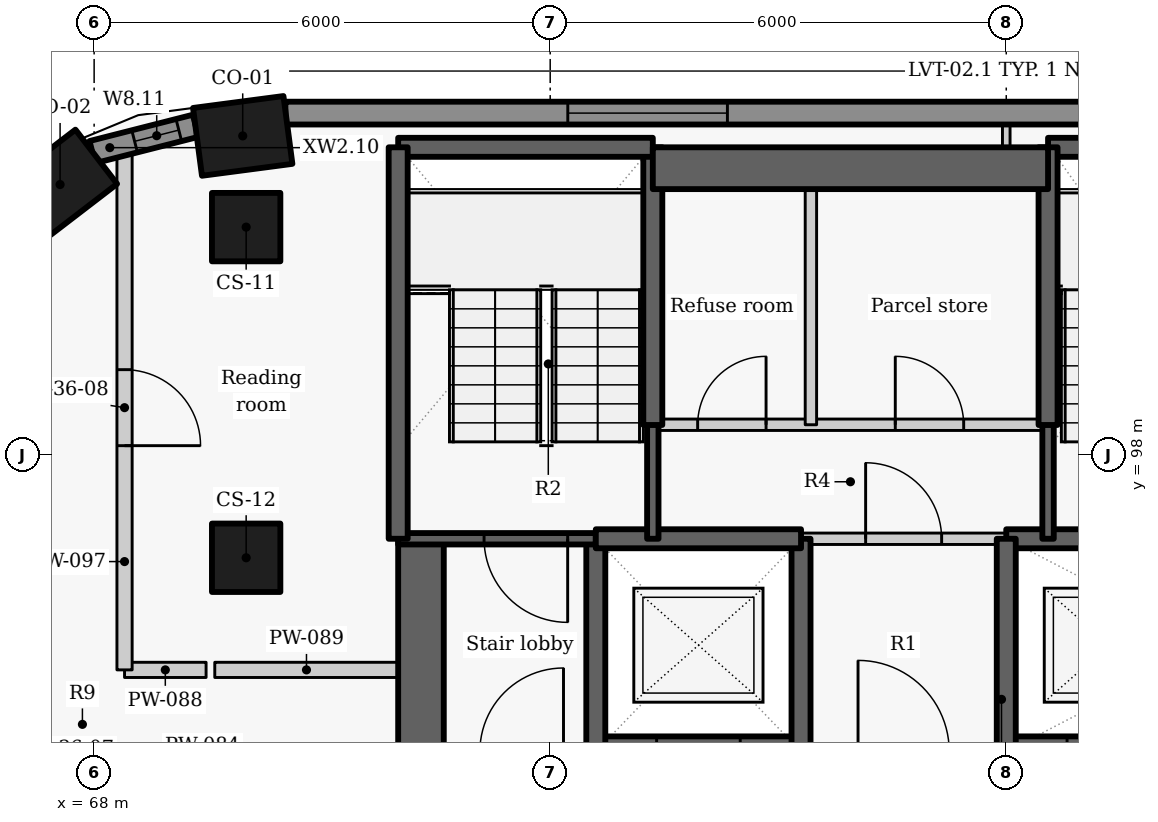
"""IFC4 building model, lengths in metres.
Left out: names, types, materials, properties, quantities, classifications, styles, units other than length and angle.
Written with IfcOpenShell. Run it as: python <this file> out.ifc"""

import sys

from ifc_helpers import new_model, si_unit, direction, frame, frame_2d, origin, origin_2d, place, context, subcontext, project, spatial, rectangle, extrude, element, fill, save


model = new_model("IFC4")
c1 = context("Model", 3, precision=1e-05, world=origin(), true_north=direction((0.0, 1.0)))
c2 = subcontext(c1, "Body", "Model", "MODEL_VIEW")
j1 = project(units=[si_unit("LENGTHUNIT", "METRE"), si_unit("PLANEANGLEUNIT", "RADIAN")], contexts=[c1])
p1 = place(None, origin())
s1 = spatial("IfcSite", under=j1, at=p1, CompositionType="ELEMENT")
p2 = place(p1, origin())
s2 = spatial("IfcBuilding", under=s1, at=p2, CompositionType="ELEMENT")
p3 = place(p2, frame((0.0, 0.0, 216.3)))
s3 = spatial("IfcBuildingStorey", under=s2, at=p3, CompositionType="ELEMENT", Elevation=216.3)
for number, where, z_axis, x_axis in (
    (1, (69.955, 102.2, 0.0), (0.0, 0.0, 1.0), (-0.991, -0.131, 0.0)),
    (2, (67.552, 101.56, 0.0), (0.0, 0.0, 1.0), (-0.793, -0.609, 0.0)),
):
    element("IfcColumn", number, at=place(p3, frame(where, z_axis=z_axis, x_axis=x_axis)), inside=s3, PredefinedType="COLUMN", context=c2, shape_type="SweptSolid", body=[
        extrude(rectangle(XDim=1.2, YDim=0.9, at=origin_2d()), origin(), (0.0, 0.0, 1.0), 3.3),
    ])
for number, where, z_axis, x_axis in (
    (3, (70.0, 101.0, 0.0), (0.0, 0.0, 1.0), (0.0, -1.0, 0.0)),
    (4, (70.0, 96.65, 0.0), (0.0, 0.0, 1.0), (0.0, -1.0, 0.0)),
):
    element("IfcColumn", number, at=place(p3, frame(where, z_axis=z_axis, x_axis=x_axis)), inside=s3, PredefinedType="COLUMN", context=c2, shape_type="SweptSolid", body=[
        extrude(rectangle(XDim=0.9, YDim=0.9, at=origin_2d()), origin(), (0.0, 0.0, 1.0), 3.3),
    ])
p4 = place(p3, frame((89.449, 102.5, 0.0), z_axis=(0.0, 0.0, 1.0), x_axis=(-1.0, 0.0, 0.0)))
e5 = element("IfcWall", 5, at=p4, inside=s3, PredefinedType="SOLIDWALL", context=c2, shape_type="SweptSolid", body=[
    extrude(rectangle(XDim=18.933, YDim=0.3, at=frame_2d((9.466, 0.0))), origin(), (0.0, 0.0, 1.0), 2.05),
])
p5 = place(p4, frame((3.687, 0.0, 0.9)))
e6 = element("IfcOpeningElement", 6, at=p5, cuts=e5, PredefinedType="OPENING", context=c2, shape_type="SweptSolid", body=[
    extrude(rectangle(XDim=2.1, YDim=1.1, at=frame_2d((1.05, 0.55))), frame((0.0, 0.16, 0.0), z_axis=(0.0, -1.0, 0.0), x_axis=(1.0, 0.0, 0.0)), (0.0, 0.0, 1.0), 0.32),
])
p6 = place(p4, frame((13.118, 0.0, 0.9)))
e7 = element("IfcOpeningElement", 7, at=p6, cuts=e5, PredefinedType="OPENING", context=c2, shape_type="SweptSolid", body=[
    extrude(rectangle(XDim=2.1, YDim=1.1, at=frame_2d((1.05, 0.55))), frame((0.0, 0.16, 0.0), z_axis=(0.0, -1.0, 0.0), x_axis=(1.0, 0.0, 0.0)), (0.0, 0.0, 1.0), 0.32),
])
p7 = place(p3, frame((69.336, 102.333, 0.0), z_axis=(0.0, 0.0, 1.0), x_axis=(-0.969037396898, -0.246914000036, 0.0)))
e8 = element("IfcWall", 8, at=p7, inside=s3, PredefinedType="SOLIDWALL", context=c2, shape_type="SweptSolid", body=[
    extrude(rectangle(XDim=1.403, YDim=0.3, at=frame_2d((0.702, 0.0))), origin(), (0.0, 0.0, 1.0), 2.05),
])
p8 = place(p7, frame((0.229, 0.0, 0.9)))
e9 = element("IfcOpeningElement", 9, at=p8, cuts=e8, PredefinedType="OPENING", context=c2, shape_type="SweptSolid", body=[
    extrude(rectangle(XDim=0.6, YDim=1.1, at=frame_2d((0.3, 0.55))), frame((0.0, 0.16, 0.0), z_axis=(0.0, -1.0, 0.0), x_axis=(1.0, 0.0, 0.0)), (0.0, 0.0, 1.0), 0.32),
])
p9 = place(p3, frame((72.3, 87.8, -0.275), z_axis=(0.0, 0.0, 1.0), x_axis=(0.0, 1.0, 0.0)))
e10 = element("IfcWall", 10, at=p9, inside=s3, PredefinedType="SHEAR", context=c2, shape_type="SweptSolid", body=[
    extrude(rectangle(XDim=9.1, YDim=0.6, at=frame_2d((4.55, 0.0))), origin(), (0.0, 0.0, 1.0), 3.225),
])
p10 = place(p9, frame((3.852, 0.0, 0.275)))
e11 = element("IfcOpeningElement", 11, at=p10, cuts=e10, PredefinedType="OPENING", context=c2, shape_type="SweptSolid", body=[
    extrude(rectangle(XDim=1.5, YDim=2.1, at=frame_2d((0.75, 1.05))), frame((0.0, 0.31, 0.0), z_axis=(0.0, -1.0, 0.0), x_axis=(1.0, 0.0, 0.0)), (0.0, 0.0, 1.0), 0.62),
])
p11 = place(p3, frame((74.597, 94.1, -0.275), z_axis=(0.0, 0.0, 1.0), x_axis=(1.0, 0.0, 0.0)))
e12 = element("IfcWall", 12, at=p11, inside=s3, PredefinedType="SHEAR", context=c2, shape_type="SweptSolid", body=[
    extrude(rectangle(XDim=2.706, YDim=0.4, at=frame_2d((1.353, 0.0))), origin(), (0.0, 0.0, 1.0), 3.225),
])
p12 = place(p11, frame((0.803, 0.0, 0.275)))
e13 = element("IfcOpeningElement", 13, at=p12, cuts=e12, PredefinedType="OPENING", context=c2, shape_type="SweptSolid", body=[
    extrude(rectangle(XDim=1.1, YDim=2.1, at=frame_2d((0.55, 1.05))), frame((0.0, 0.21, 0.0), z_axis=(0.0, -1.0, 0.0), x_axis=(1.0, 0.0, 0.0)), (0.0, 0.0, 1.0), 0.42),
])
p13 = place(p3, frame((79.997, 94.1, -0.275), z_axis=(0.0, 0.0, 1.0), x_axis=(1.0, 0.0, 0.0)))
e14 = element("IfcWall", 14, at=p13, inside=s3, PredefinedType="SHEAR", context=c2, shape_type="SweptSolid", body=[
    extrude(rectangle(XDim=5.406, YDim=0.4, at=frame_2d((2.703, 0.0))), origin(), (0.0, 0.0, 1.0), 3.225),
])
p14 = place(p13, frame((0.803, 0.0, 0.275)))
e15 = element("IfcOpeningElement", 15, at=p14, cuts=e14, PredefinedType="OPENING", context=c2, shape_type="SweptSolid", body=[
    extrude(rectangle(XDim=1.1, YDim=2.1, at=frame_2d((0.55, 1.05))), frame((0.0, 0.21, 0.0), z_axis=(0.0, -1.0, 0.0), x_axis=(1.0, 0.0, 0.0)), (0.0, 0.0, 1.0), 0.42),
])
p15 = place(p3, frame((74.6, 94.1, -0.275), z_axis=(0.0, 0.0, 1.0), x_axis=(0.0, 1.0, 0.0)))
e16 = element("IfcWall", 16, at=p15, inside=s3, PredefinedType="SHEAR", context=c2, shape_type="SweptSolid", body=[
    extrude(rectangle(XDim=2.8, YDim=0.25, at=frame_2d((1.4, 0.0))), origin(), (0.0, 0.0, 1.0), 3.225),
])
p16 = place(p3, frame((74.6, 96.9, -0.275), z_axis=(0.0, 0.0, 1.0), x_axis=(-1.0, 0.0, 0.0)))
e17 = element("IfcWall", 17, at=p16, inside=s3, PredefinedType="SHEAR", context=c2, shape_type="SweptSolid", body=[
    extrude(rectangle(XDim=2.6, YDim=0.15, at=frame_2d((1.3, 0.0))), origin(), (0.0, 0.0, 1.0), 3.225),
])
p17 = place(p16, frame((0.37, 0.0, 0.275)))
e18 = element("IfcOpeningElement", 18, at=p17, cuts=e17, PredefinedType="OPENING", context=c2, shape_type="SweptSolid", body=[
    extrude(rectangle(XDim=1.1, YDim=2.1, at=frame_2d((0.55, 1.05))), frame((0.0, 0.085, 0.0), z_axis=(0.0, -1.0, 0.0), x_axis=(1.0, 0.0, 0.0)), (0.0, 0.0, 1.0), 0.17),
])
p18 = place(p3, frame((77.3, 94.1, -0.275), z_axis=(0.0, 0.0, 1.0), x_axis=(0.0, 1.0, 0.0)))
e19 = element("IfcWall", 19, at=p18, inside=s3, PredefinedType="SHEAR", context=c2, shape_type="SweptSolid", body=[
    extrude(rectangle(XDim=2.8, YDim=0.25, at=frame_2d((1.4, 0.0))), origin(), (0.0, 0.0, 1.0), 3.225),
])
p19 = place(p3, frame((74.6, 96.9, -0.275), z_axis=(0.0, 0.0, 1.0), x_axis=(1.0, 0.0, 0.0)))
e20 = element("IfcWall", 20, at=p19, inside=s3, PredefinedType="SHEAR", context=c2, shape_type="SweptSolid", body=[
    extrude(rectangle(XDim=2.7, YDim=0.25, at=frame_2d((1.35, 0.0))), origin(), (0.0, 0.0, 1.0), 3.225),
])
p20 = place(p3, frame((80.0, 96.9, -0.275), z_axis=(0.0, 0.0, 1.0), x_axis=(1.0, 0.0, 0.0)))
e21 = element("IfcWall", 21, at=p20, inside=s3, PredefinedType="SHEAR", context=c2, shape_type="SweptSolid", body=[
    extrude(rectangle(XDim=8.0, YDim=0.25, at=frame_2d((4.0, 0.0))), origin(), (0.0, 0.0, 1.0), 3.225),
])
p21 = place(p20, frame((3.849, 0.0, 0.275)))
e22 = element("IfcOpeningElement", 22, at=p21, cuts=e21, PredefinedType="OPENING", context=c2, shape_type="SweptSolid", body=[
    extrude(rectangle(XDim=1.1, YDim=2.1, at=frame_2d((0.55, 1.05))), frame((0.0, 0.135, 0.0), z_axis=(0.0, -1.0, 0.0), x_axis=(1.0, 0.0, 0.0)), (0.0, 0.0, 1.0), 0.27),
])
p22 = place(p3, frame((80.0, 94.1, -0.275), z_axis=(0.0, 0.0, 1.0), x_axis=(0.0, 1.0, 0.0)))
e23 = element("IfcWall", 23, at=p22, inside=s3, PredefinedType="SHEAR", context=c2, shape_type="SweptSolid", body=[
    extrude(rectangle(XDim=2.8, YDim=0.25, at=frame_2d((1.4, 0.0))), origin(), (0.0, 0.0, 1.0), 3.225),
])
p23 = place(p3, frame((77.3, 96.9, 0.0), z_axis=(0.0, 0.0, 1.0), x_axis=(1.0, 0.0, 0.0)))
e24 = element("IfcWall", 24, at=p23, inside=s3, PredefinedType="PARTITIONING", context=c2, shape_type="SweptSolid", body=[
    extrude(rectangle(XDim=2.7, YDim=0.15, at=frame_2d((1.35, 0.0))), origin(), (0.0, 0.0, 1.0), 2.95),
])
p24 = place(p23, frame((0.85, 0.0, 0.0)))
e25 = element("IfcOpeningElement", 25, at=p24, cuts=e24, PredefinedType="OPENING", context=c2, shape_type="SweptSolid", body=[
    extrude(rectangle(XDim=1.0, YDim=2.1, at=frame_2d((0.5, 1.05))), frame((0.0, 0.085, 0.0), z_axis=(0.0, -1.0, 0.0), x_axis=(1.0, 0.0, 0.0)), (0.0, 0.0, 1.0), 0.17),
])
p25 = place(p3, frame((75.35, 96.9, -0.275), z_axis=(0.0, 0.0, 1.0), x_axis=(0.0, 1.0, 0.0)))
e26 = element("IfcWall", 26, at=p25, inside=s3, PredefinedType="SHEAR", context=c2, shape_type="SweptSolid", body=[
    extrude(rectangle(XDim=1.503, YDim=0.15, at=frame_2d((0.751, 0.0))), origin(), (0.0, 0.0, 1.0), 3.225),
])
p26 = place(p3, frame((75.35, 98.397, -0.275), z_axis=(0.0, 0.0, 1.0), x_axis=(0.0, 1.0, 0.0)))
e27 = element("IfcWall", 27, at=p26, inside=s3, PredefinedType="SHEAR", context=c2, shape_type="SweptSolid", body=[
    extrude(rectangle(XDim=3.653, YDim=0.25, at=frame_2d((1.827, 0.0))), origin(), (0.0, 0.0, 1.0), 3.225),
])
p27 = place(p3, frame((72.0, 102.05, -0.275), z_axis=(0.0, 0.0, 1.0), x_axis=(1.0, 0.0, 0.0)))
e28 = element("IfcWall", 28, at=p27, inside=s3, PredefinedType="SHEAR", context=c2, shape_type="SweptSolid", body=[
    extrude(rectangle(XDim=3.35, YDim=0.25, at=frame_2d((1.675, 0.0))), origin(), (0.0, 0.0, 1.0), 3.225),
])
p28 = place(p3, frame((80.55, 102.05, -0.275), z_axis=(0.0, 0.0, 1.0), x_axis=(1.0, 0.0, 0.0)))
e29 = element("IfcWall", 29, at=p28, inside=s3, PredefinedType="SHEAR", context=c2, shape_type="SweptSolid", body=[
    extrude(rectangle(XDim=2.85, YDim=0.25, at=frame_2d((1.425, 0.0))), origin(), (0.0, 0.0, 1.0), 3.225),
])
p29 = place(p3, frame((72.0, 96.9, -0.275), z_axis=(0.0, 0.0, 1.0), x_axis=(0.0, 1.0, 0.0)))
e30 = element("IfcWall", 30, at=p29, inside=s3, PredefinedType="SHEAR", context=c2, shape_type="SweptSolid", body=[
    extrude(rectangle(XDim=5.15, YDim=0.25, at=frame_2d((2.575, 0.0))), origin(), (0.0, 0.0, 1.0), 3.225),
])
p30 = place(p3, frame((80.55, 96.9, -0.275), z_axis=(0.0, 0.0, 1.0), x_axis=(0.0, 1.0, 0.0)))
e31 = element("IfcWall", 31, at=p30, inside=s3, PredefinedType="SHEAR", context=c2, shape_type="SweptSolid", body=[
    extrude(rectangle(XDim=1.503, YDim=0.15, at=frame_2d((0.751, 0.0))), origin(), (0.0, 0.0, 1.0), 3.225),
])
p31 = place(p3, frame((80.55, 98.397, -0.275), z_axis=(0.0, 0.0, 1.0), x_axis=(0.0, 1.0, 0.0)))
e32 = element("IfcWall", 32, at=p31, inside=s3, PredefinedType="SHEAR", context=c2, shape_type="SweptSolid", body=[
    extrude(rectangle(XDim=3.653, YDim=0.25, at=frame_2d((1.827, 0.0))), origin(), (0.0, 0.0, 1.0), 3.225),
])
p32 = place(p3, frame((75.35, 101.775, -0.275), z_axis=(0.0, 0.0, 1.0), x_axis=(1.0, 0.0, 0.0)))
e33 = element("IfcWall", 33, at=p32, inside=s3, PredefinedType="SHEAR", context=c2, shape_type="SweptSolid", body=[
    extrude(rectangle(XDim=5.2, YDim=0.55, at=frame_2d((2.6, 0.0))), origin(), (0.0, 0.0, 1.0), 3.225),
])
p33 = place(p3, frame((75.35, 98.4, 0.0), z_axis=(0.0, 0.0, 1.0), x_axis=(1.0, 0.0, 0.0)))
e34 = element("IfcWall", 34, at=p33, inside=s3, PredefinedType="PARTITIONING", context=c2, shape_type="SweptSolid", body=[
    extrude(rectangle(XDim=5.2, YDim=0.15, at=frame_2d((2.6, 0.0))), origin(), (0.0, 0.0, 1.0), 2.95),
])
p34 = place(p33, frame((0.59, 0.0, 0.0)))
e35 = element("IfcOpeningElement", 35, at=p34, cuts=e34, PredefinedType="OPENING", context=c2, shape_type="SweptSolid", body=[
    extrude(rectangle(XDim=0.9, YDim=2.1, at=frame_2d((0.45, 1.05))), frame((0.0, 0.085, 0.0), z_axis=(0.0, -1.0, 0.0), x_axis=(1.0, 0.0, 0.0)), (0.0, 0.0, 1.0), 0.17),
])
p35 = place(p33, frame((3.19, 0.0, 0.0)))
e36 = element("IfcOpeningElement", 36, at=p35, cuts=e34, PredefinedType="OPENING", context=c2, shape_type="SweptSolid", body=[
    extrude(rectangle(XDim=0.9, YDim=2.1, at=frame_2d((0.45, 1.05))), frame((0.0, 0.085, 0.0), z_axis=(0.0, -1.0, 0.0), x_axis=(1.0, 0.0, 0.0)), (0.0, 0.0, 1.0), 0.17),
])
p36 = place(p3, frame((77.43, 98.4, 0.0), z_axis=(0.0, 0.0, 1.0), x_axis=(0.0, 1.0, 0.0)))
e37 = element("IfcWall", 37, at=p36, inside=s3, PredefinedType="PARTITIONING", context=c2, shape_type="SweptSolid", body=[
    extrude(rectangle(XDim=3.65, YDim=0.15, at=frame_2d((1.825, 0.0))), origin(), (0.0, 0.0, 1.0), 2.95),
])
p37 = place(p3, frame((68.4, 95.175, 0.0), z_axis=(0.0, 0.0, 1.0), x_axis=(1.0, 0.0, 0.0)))
e38 = element("IfcWall", 38, at=p37, inside=s3, PredefinedType="PARTITIONING", context=c2, shape_type="SweptSolid", body=[
    extrude(rectangle(XDim=1.073, YDim=0.2, at=frame_2d((0.537, 0.0))), origin(), (0.0, 0.0, 1.0), 2.95),
])
p38 = place(p3, frame((69.587, 95.175, 0.0), z_axis=(0.0, 0.0, 1.0), x_axis=(1.0, 0.0, 0.0)))
e39 = element("IfcWall", 39, at=p38, inside=s3, PredefinedType="PARTITIONING", context=c2, shape_type="SweptSolid", body=[
    extrude(rectangle(XDim=2.413, YDim=0.2, at=frame_2d((1.207, 0.0))), origin(), (0.0, 0.0, 1.0), 2.43),
])
p39 = place(p3, frame((68.4, 102.074, 0.0), z_axis=(0.0, 0.0, 1.0), x_axis=(0.0, -1.0, 0.0)))
e40 = element("IfcWall", 40, at=p39, inside=s3, PredefinedType="PARTITIONING", context=c2, shape_type="SweptSolid", body=[
    extrude(rectangle(XDim=6.899, YDim=0.2, at=frame_2d((3.449, 0.0))), origin(), (0.0, 0.0, 1.0), 2.03),
])
p40 = place(p39, frame((2.949, 0.0, 0.0)))
e41 = element("IfcOpeningElement", 41, at=p40, cuts=e40, PredefinedType="OPENING", context=c2, shape_type="SweptSolid", body=[
    extrude(rectangle(XDim=1.0, YDim=2.01, at=frame_2d((0.5, 1.005))), frame((0.0, 0.11, 0.0), z_axis=(0.0, -1.0, 0.0), x_axis=(1.0, 0.0, 0.0)), (0.0, 0.0, 1.0), 0.22),
])
p41 = place(p3, frame((80.0, 102.05, 0.0), z_axis=(0.0, 0.0, 1.0), x_axis=(0.0, 1.0, 0.0)))
e42 = element("IfcWall", 42, at=p41, inside=s3, PredefinedType="PARTITIONING", context=c2, shape_type="SweptSolid", body=[
    extrude(rectangle(XDim=0.3, YDim=0.1, at=frame_2d((0.15, 0.0))), origin(), (0.0, 0.0, 1.0), 2.95),
])
p42 = place(p6, origin())
e43 = element("IfcWindow", 43, at=p42, inside=s3, PartitioningType="SINGLE_PANEL", PredefinedType="WINDOW", context=c2, shape_type="SweptSolid", body=[
    extrude(rectangle(XDim=2.1, YDim=1.1, at=frame_2d((1.05, 0.55))), frame((0.0, 0.03, 0.0), z_axis=(0.0, -1.0, 0.0), x_axis=(1.0, 0.0, 0.0)), (0.0, 0.0, 1.0), 0.06),
])
fill(e7, e43)
p43 = place(p8, origin())
e44 = element("IfcWindow", 44, at=p43, inside=s3, PartitioningType="SINGLE_PANEL", PredefinedType="WINDOW", context=c2, shape_type="SweptSolid", body=[
    extrude(rectangle(XDim=0.6, YDim=1.1, at=frame_2d((0.3, 0.55))), frame((0.0, 0.03, 0.0), z_axis=(0.0, -1.0, 0.0), x_axis=(1.0, 0.0, 0.0)), (0.0, 0.0, 1.0), 0.06),
])
fill(e9, e44)
p44 = place(p24, origin())
e45 = element("IfcDoor", 45, at=p44, inside=s3, OperationType="SINGLE_SWING_LEFT", PredefinedType="DOOR", context=c2, shape_type="SweptSolid", body=[
    extrude(rectangle(XDim=1.0, YDim=2.1, at=frame_2d((0.5, 1.05))), frame((0.0, 0.025, 0.0), z_axis=(0.0, -1.0, 0.0), x_axis=(1.0, 0.0, 0.0)), (0.0, 0.0, 1.0), 0.05),
])
fill(e25, e45)
p45 = place(p34, origin())
e46 = element("IfcDoor", 46, at=p45, inside=s3, OperationType="SINGLE_SWING_RIGHT", PredefinedType="DOOR", context=c2, shape_type="SweptSolid", body=[
    extrude(rectangle(XDim=0.9, YDim=2.1, at=frame_2d((0.45, 1.05))), frame((0.0, 0.025, 0.0), z_axis=(0.0, -1.0, 0.0), x_axis=(1.0, 0.0, 0.0)), (0.0, 0.0, 1.0), 0.05),
])
fill(e35, e46)
p46 = place(p35, origin())
e47 = element("IfcDoor", 47, at=p46, inside=s3, OperationType="SINGLE_SWING_LEFT", PredefinedType="DOOR", context=c2, shape_type="SweptSolid", body=[
    extrude(rectangle(XDim=0.9, YDim=2.1, at=frame_2d((0.45, 1.05))), frame((0.0, 0.025, 0.0), z_axis=(0.0, -1.0, 0.0), x_axis=(1.0, 0.0, 0.0)), (0.0, 0.0, 1.0), 0.05),
])
fill(e36, e47)
p47 = place(p17, origin())
e48 = element("IfcDoor", 48, at=p47, inside=s3, OperationType="SINGLE_SWING_LEFT", PredefinedType="DOOR", context=c2, shape_type="SweptSolid", body=[
    extrude(rectangle(XDim=1.1, YDim=2.1, at=frame_2d((0.55, 1.05))), frame((0.0, 0.025, 0.0), z_axis=(0.0, -1.0, 0.0), x_axis=(1.0, 0.0, 0.0)), (0.0, 0.0, 1.0), 0.05),
])
fill(e18, e48)
p48 = place(p40, origin())
e49 = element("IfcDoor", 49, at=p48, inside=s3, OperationType="SINGLE_SWING_RIGHT", PredefinedType="DOOR", context=c2, shape_type="SweptSolid", body=[
    extrude(rectangle(XDim=1.0, YDim=2.01, at=frame_2d((0.5, 1.005))), frame((0.0, 0.025, 0.0), z_axis=(0.0, -1.0, 0.0), x_axis=(1.0, 0.0, 0.0)), (0.0, 0.0, 1.0), 0.05),
])
fill(e41, e49)
save(model, sys.argv[1])
